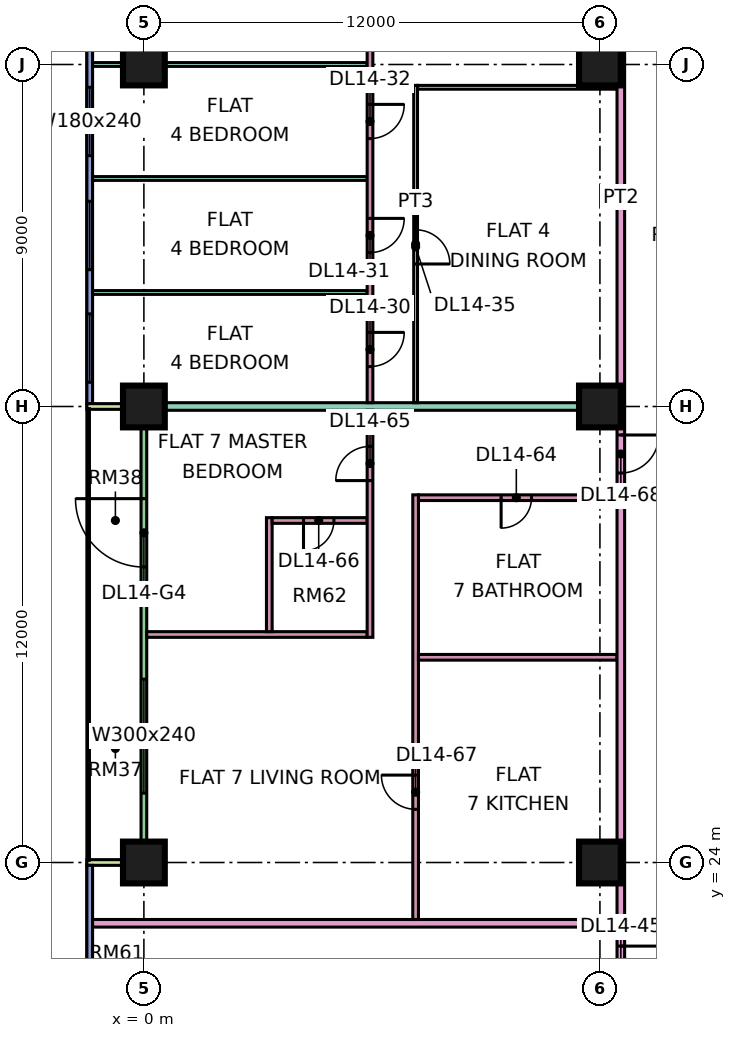
"""IFC4 building model, lengths in metres.
Left out: names, types, materials, properties, quantities, classifications, styles, units other than length and angle.
Written with IfcOpenShell. Run it as: python <this file> out.ifc"""

import sys

from ifc_helpers import new_model, si_unit, direction, frame, frame_2d, origin, origin_2d, place, context, subcontext, project, spatial, rectangle, extrude, element, fill, save


model = new_model("IFC4")
c1 = context("Model", 3, precision=1e-05, world=origin(), true_north=direction((0.0, 1.0)))
c2 = subcontext(c1, "Body", "Model", "MODEL_VIEW")
j1 = project(units=[si_unit("LENGTHUNIT", "METRE"), si_unit("PLANEANGLEUNIT", "RADIAN")], contexts=[c1])
p1 = place(None, origin())
s1 = spatial("IfcSite", under=j1, at=p1, CompositionType="ELEMENT")
p2 = place(p1, origin())
s2 = spatial("IfcBuilding", under=s1, at=p2, CompositionType="ELEMENT")
p3 = place(p2, frame((0.0, 0.0, 67.65)))
s3 = spatial("IfcBuildingStorey", under=s2, at=p3, CompositionType="ELEMENT", Elevation=67.65)
p4 = place(p3, frame((0.0, 24.0, 0.0), z_axis=(0.0, 0.0, 1.0), x_axis=(1.0, 0.0, 0.0)))
e1 = element("IfcColumn", 1, at=p4, inside=s3, PredefinedType="COLUMN", context=c2, shape_type="SweptSolid", body=[
    extrude(rectangle(XDim=1.1, YDim=1.1, at=origin_2d()), origin(), (0.0, 0.0, 1.0), 3.75),
])
p5 = place(p3, frame((0.0, 36.0, 0.0), z_axis=(0.0, 0.0, 1.0), x_axis=(1.0, 0.0, 0.0)))
e2 = element("IfcColumn", 2, at=p5, inside=s3, PredefinedType="COLUMN", context=c2, shape_type="SweptSolid", body=[
    extrude(rectangle(XDim=1.1, YDim=1.1, at=origin_2d()), origin(), (0.0, 0.0, 1.0), 3.75),
])
for number, where, z_axis, x_axis in (
    (3, (0.0, 45.0, 0.0), (0.0, 0.0, 1.0), (1.0, 0.0, 0.0)),
    (4, (12.0, 24.0, 0.0), (0.0, 0.0, 1.0), (1.0, 0.0, 0.0)),
    (5, (12.0, 36.0, 0.0), (0.0, 0.0, 1.0), (1.0, 0.0, 0.0)),
    (6, (12.0, 45.0, 0.0), (0.0, 0.0, 1.0), (1.0, 0.0, 0.0)),
):
    element("IfcColumn", number, at=place(p3, frame(where, z_axis=z_axis, x_axis=x_axis)), inside=s3, PredefinedType="COLUMN", context=c2, shape_type="SweptSolid", body=[
        extrude(rectangle(XDim=1.1, YDim=1.1, at=origin_2d()), origin(), (0.0, 0.0, 1.0), 3.75),
    ])
p6 = place(p3, frame((-1.425, 47.925, 0.0), z_axis=(0.0, 0.0, 1.0), x_axis=(0.0, -1.0, 0.0)))
e7 = element("IfcWall", 7, at=p6, inside=s3, PredefinedType="SOLIDWALL", context=c2, shape_type="SweptSolid", body=[
    extrude(rectangle(XDim=11.85, YDim=0.15, at=frame_2d((5.925, 0.0))), origin(), (0.0, 0.0, 1.0), 3.35),
])
p7 = place(p6, frame((0.562, 0.0, 0.45)))
e8 = element("IfcOpeningElement", 8, at=p7, cuts=e7, PredefinedType="OPENING", context=c2, shape_type="SweptSolid", body=[
    extrude(rectangle(XDim=1.8, YDim=2.4, at=frame_2d((0.9, 1.2))), frame((0.0, 0.085, 0.0), z_axis=(0.0, -1.0, 0.0), x_axis=(1.0, 0.0, 0.0)), (0.0, 0.0, 1.0), 0.17),
])
p8 = place(p6, frame((3.525, 0.0, 0.45)))
e9 = element("IfcOpeningElement", 9, at=p8, cuts=e7, PredefinedType="OPENING", context=c2, shape_type="SweptSolid", body=[
    extrude(rectangle(XDim=1.8, YDim=2.4, at=frame_2d((0.9, 1.2))), frame((0.0, 0.085, 0.0), z_axis=(0.0, -1.0, 0.0), x_axis=(1.0, 0.0, 0.0)), (0.0, 0.0, 1.0), 0.17),
])
p9 = place(p6, frame((6.525, 0.0, 0.45)))
e10 = element("IfcOpeningElement", 10, at=p9, cuts=e7, PredefinedType="OPENING", context=c2, shape_type="SweptSolid", body=[
    extrude(rectangle(XDim=1.8, YDim=2.4, at=frame_2d((0.9, 1.2))), frame((0.0, 0.085, 0.0), z_axis=(0.0, -1.0, 0.0), x_axis=(1.0, 0.0, 0.0)), (0.0, 0.0, 1.0), 0.17),
])
p10 = place(p6, frame((9.488, 0.0, 0.45)))
e11 = element("IfcOpeningElement", 11, at=p10, cuts=e7, PredefinedType="OPENING", context=c2, shape_type="SweptSolid", body=[
    extrude(rectangle(XDim=1.8, YDim=2.4, at=frame_2d((0.9, 1.2))), frame((0.0, 0.085, 0.0), z_axis=(0.0, -1.0, 0.0), x_axis=(1.0, 0.0, 0.0)), (0.0, 0.0, 1.0), 0.17),
])
p11 = place(p3, frame((0.0, 35.925, 0.0), z_axis=(0.0, 0.0, 1.0), x_axis=(0.0, -1.0, 0.0)))
e12 = element("IfcWall", 12, at=p11, inside=s3, PredefinedType="SOLIDWALL", context=c2, shape_type="SweptSolid", body=[
    extrude(rectangle(XDim=11.85, YDim=0.15, at=frame_2d((5.925, 0.0))), origin(), (0.0, 0.0, 1.0), 3.35),
])
p12 = place(p11, frame((2.35, 0.0, 0.0)))
e13 = element("IfcOpeningElement", 13, at=p12, cuts=e12, PredefinedType="OPENING", context=c2, shape_type="SweptSolid", body=[
    extrude(rectangle(XDim=1.8, YDim=2.4, at=frame_2d((0.9, 1.2))), frame((0.0, 0.085, 0.0), z_axis=(0.0, -1.0, 0.0), x_axis=(1.0, 0.0, 0.0)), (0.0, 0.0, 1.0), 0.17),
])
p13 = place(p11, frame((7.1, 0.0, 0.45)))
e14 = element("IfcOpeningElement", 14, at=p13, cuts=e12, PredefinedType="OPENING", context=c2, shape_type="SweptSolid", body=[
    extrude(rectangle(XDim=3.0, YDim=2.4, at=frame_2d((1.5, 1.2))), frame((0.0, 0.085, 0.0), z_axis=(0.0, -1.0, 0.0), x_axis=(1.0, 0.0, 0.0)), (0.0, 0.0, 1.0), 0.17),
])
for number, where, z_axis, x_axis in (
    (15, (-1.5, 36.0, 0.0), (0.0, 0.0, 1.0), (1.0, 0.0, 0.0)),
    (16, (-1.5, 24.0, 0.0), (0.0, 0.0, 1.0), (1.0, 0.0, 0.0)),
):
    element("IfcWall", number, at=place(p3, frame(where, z_axis=z_axis, x_axis=x_axis)), inside=s3, PredefinedType="SOLIDWALL", context=c2, shape_type="SweptSolid", body=[
        extrude(rectangle(XDim=1.5, YDim=0.15, at=frame_2d((0.75, 0.0))), origin(), (0.0, 0.0, 1.0), 3.35),
    ])
p14 = place(p3, frame((-1.425, 23.925, 0.0), z_axis=(0.0, 0.0, 1.0), x_axis=(0.0, -1.0, 0.0)))
e17 = element("IfcWall", 17, at=p14, inside=s3, PredefinedType="SOLIDWALL", context=c2, shape_type="SweptSolid", body=[
    extrude(rectangle(XDim=11.425, YDim=0.15, at=frame_2d((5.712, 0.0))), origin(), (0.0, 0.0, 1.0), 3.35),
])
p15 = place(p14, frame((6.175, 0.0, 0.45)))
e18 = element("IfcOpeningElement", 18, at=p15, cuts=e17, PredefinedType="OPENING", context=c2, shape_type="SweptSolid", body=[
    extrude(rectangle(XDim=3.0, YDim=2.4, at=frame_2d((1.5, 1.2))), frame((0.0, 0.085, 0.0), z_axis=(0.0, -1.0, 0.0), x_axis=(1.0, 0.0, 0.0)), (0.0, 0.0, 1.0), 0.17),
])
for number, where, z_axis, x_axis in (
    (19, (-1.351, 39.0, 0.0), (0.0, 0.0, 1.0), (1.0, 0.0, 0.0)),
    (20, (-1.351, 42.0, 0.0), (0.0, 0.0, 1.0), (1.0, 0.0, 0.0)),
    (21, (-1.351, 45.0, 0.0), (0.0, 0.0, 1.0), (1.0, 0.0, 0.0)),
):
    element("IfcWall", number, at=place(p3, frame(where, z_axis=z_axis, x_axis=x_axis)), inside=s3, PredefinedType="PARTITIONING", context=c2, shape_type="SweptSolid", body=[
        extrude(rectangle(XDim=7.226, YDim=0.1, at=frame_2d((3.613, 0.0))), origin(), (0.0, 0.0, 1.0), 3.35),
    ])
p16 = place(p3, frame((-1.35, 22.4, 0.0), z_axis=(0.0, 0.0, 1.0), x_axis=(1.0, 0.0, 0.0)))
e22 = element("IfcWall", 22, at=p16, inside=s3, PredefinedType="PARTITIONING", context=c2, shape_type="SweptSolid", body=[
    extrude(rectangle(XDim=13.8, YDim=0.2, at=frame_2d((6.9, 0.0))), origin(), (0.0, 0.0, 1.0), 3.35),
])
e23 = element("IfcWall", 23, at=p5, inside=s3, PredefinedType="PARTITIONING", context=c2, shape_type="SweptSolid", body=[
    extrude(rectangle(XDim=12.45, YDim=0.2, at=frame_2d((6.225, 0.0))), origin(), (0.0, 0.0, 1.0), 3.35),
])
p17 = place(p3, frame((0.074, 30.0, 0.0), z_axis=(0.0, 0.0, 1.0), x_axis=(1.0, 0.0, 0.0)))
e24 = element("IfcWall", 24, at=p17, inside=s3, PredefinedType="PARTITIONING", context=c2, shape_type="SweptSolid", body=[
    extrude(rectangle(XDim=5.801, YDim=0.15, at=frame_2d((2.9, 0.0))), origin(), (0.0, 0.0, 1.0), 3.35),
])
p18 = place(p3, frame((3.3, 30.075, 0.0), z_axis=(0.0, 0.0, 1.0), x_axis=(0.0, 1.0, 0.0)))
e25 = element("IfcWall", 25, at=p18, inside=s3, PredefinedType="PARTITIONING", context=c2, shape_type="SweptSolid", body=[
    extrude(rectangle(XDim=3.0, YDim=0.15, at=frame_2d((1.5, 0.0))), origin(), (0.0, 0.0, 1.0), 3.35),
])
p19 = place(p3, frame((3.375, 33.0, 0.0), z_axis=(0.0, 0.0, 1.0), x_axis=(1.0, 0.0, 0.0)))
e26 = element("IfcWall", 26, at=p19, inside=s3, PredefinedType="PARTITIONING", context=c2, shape_type="SweptSolid", body=[
    extrude(rectangle(XDim=2.5, YDim=0.15, at=frame_2d((1.25, 0.0))), origin(), (0.0, 0.0, 1.0), 3.35),
])
p20 = place(p19, frame((0.825, 0.0, 0.0)))
e27 = element("IfcOpeningElement", 27, at=p20, cuts=e26, PredefinedType="OPENING", context=c2, shape_type="SweptSolid", body=[
    extrude(rectangle(XDim=0.8, YDim=2.1, at=frame_2d((0.4, 1.05))), frame((0.0, 0.085, 0.0), z_axis=(0.0, -1.0, 0.0), x_axis=(1.0, 0.0, 0.0)), (0.0, 0.0, 1.0), 0.17),
])
p21 = place(p3, frame((5.95, 29.925, 0.0), z_axis=(0.0, 0.0, 1.0), x_axis=(0.0, 1.0, 0.0)))
e28 = element("IfcWall", 28, at=p21, inside=s3, PredefinedType="PARTITIONING", context=c2, shape_type="SweptSolid", body=[
    extrude(rectangle(XDim=5.975, YDim=0.15, at=frame_2d((2.987, 0.0))), origin(), (0.0, 0.0, 1.0), 3.35),
])
p22 = place(p21, frame((4.125, 0.0, 0.0)))
e29 = element("IfcOpeningElement", 29, at=p22, cuts=e28, PredefinedType="OPENING", context=c2, shape_type="SweptSolid", body=[
    extrude(rectangle(XDim=0.9, YDim=2.1, at=frame_2d((0.45, 1.05))), frame((0.0, 0.085, 0.0), z_axis=(0.0, -1.0, 0.0), x_axis=(1.0, 0.0, 0.0)), (0.0, 0.0, 1.0), 0.17),
])
p23 = place(p3, frame((5.95, 36.1, 0.0), z_axis=(0.0, 0.0, 1.0), x_axis=(0.0, 1.0, 0.0)))
e30 = element("IfcWall", 30, at=p23, inside=s3, PredefinedType="PARTITIONING", context=c2, shape_type="SweptSolid", body=[
    extrude(rectangle(XDim=26.826, YDim=0.15, at=frame_2d((13.413, 0.0))), origin(), (0.0, 0.0, 1.0), 3.35),
])
p24 = place(p23, frame((0.95, 0.0, 0.0)))
e31 = element("IfcOpeningElement", 31, at=p24, cuts=e30, PredefinedType="OPENING", context=c2, shape_type="SweptSolid", body=[
    extrude(rectangle(XDim=0.9, YDim=2.1, at=frame_2d((0.45, 1.05))), frame((0.0, 0.085, 0.0), z_axis=(0.0, -1.0, 0.0), x_axis=(1.0, 0.0, 0.0)), (0.0, 0.0, 1.0), 0.17),
])
p25 = place(p23, frame((3.95, 0.0, 0.0)))
e32 = element("IfcOpeningElement", 32, at=p25, cuts=e30, PredefinedType="OPENING", context=c2, shape_type="SweptSolid", body=[
    extrude(rectangle(XDim=0.9, YDim=2.1, at=frame_2d((0.45, 1.05))), frame((0.0, 0.085, 0.0), z_axis=(0.0, -1.0, 0.0), x_axis=(1.0, 0.0, 0.0)), (0.0, 0.0, 1.0), 0.17),
])
p26 = place(p23, frame((6.95, 0.0, 0.0)))
e33 = element("IfcOpeningElement", 33, at=p26, cuts=e30, PredefinedType="OPENING", context=c2, shape_type="SweptSolid", body=[
    extrude(rectangle(XDim=0.9, YDim=2.1, at=frame_2d((0.45, 1.05))), frame((0.0, 0.085, 0.0), z_axis=(0.0, -1.0, 0.0), x_axis=(1.0, 0.0, 0.0)), (0.0, 0.0, 1.0), 0.17),
])
p27 = place(p23, frame((9.95, 0.0, 0.0)))
e34 = element("IfcOpeningElement", 34, at=p27, cuts=e30, PredefinedType="OPENING", context=c2, shape_type="SweptSolid", body=[
    extrude(rectangle(XDim=0.9, YDim=2.1, at=frame_2d((0.45, 1.05))), frame((0.0, 0.085, 0.0), z_axis=(0.0, -1.0, 0.0), x_axis=(1.0, 0.0, 0.0)), (0.0, 0.0, 1.0), 0.17),
])
p28 = place(p23, frame((18.95, 0.0, 0.0)))
e35 = element("IfcOpeningElement", 35, at=p28, cuts=e30, PredefinedType="OPENING", context=c2, shape_type="SweptSolid", body=[
    extrude(rectangle(XDim=0.9, YDim=2.1, at=frame_2d((0.45, 1.05))), frame((0.0, 0.085, 0.0), z_axis=(0.0, -1.0, 0.0), x_axis=(1.0, 0.0, 0.0)), (0.0, 0.0, 1.0), 0.17),
])
p29 = place(p23, frame((23.45, 0.0, 0.0)))
e36 = element("IfcOpeningElement", 36, at=p29, cuts=e30, PredefinedType="OPENING", context=c2, shape_type="SweptSolid", body=[
    extrude(rectangle(XDim=0.9, YDim=2.1, at=frame_2d((0.45, 1.05))), frame((0.0, 0.085, 0.0), z_axis=(0.0, -1.0, 0.0), x_axis=(1.0, 0.0, 0.0)), (0.0, 0.0, 1.0), 0.17),
])
p30 = place(p23, frame((15.55, 0.0, 0.0)))
e37 = element("IfcOpeningElement", 37, at=p30, cuts=e30, PredefinedType="OPENING", context=c2, shape_type="SweptSolid", body=[
    extrude(rectangle(XDim=1.6, YDim=2.1, at=frame_2d((0.8, 1.05))), frame((0.0, 0.085, 0.0), z_axis=(0.0, -1.0, 0.0), x_axis=(1.0, 0.0, 0.0)), (0.0, 0.0, 1.0), 0.17),
])
p31 = place(p23, frame((12.95, 0.0, 0.0)))
e38 = element("IfcOpeningElement", 38, at=p31, cuts=e30, PredefinedType="OPENING", context=c2, shape_type="SweptSolid", body=[
    extrude(rectangle(XDim=0.9, YDim=2.1, at=frame_2d((0.45, 1.05))), frame((0.0, 0.085, 0.0), z_axis=(0.0, -1.0, 0.0), x_axis=(1.0, 0.0, 0.0)), (0.0, 0.0, 1.0), 0.17),
])
p32 = place(p3, frame((7.15, 22.5, 0.0), z_axis=(0.0, 0.0, 1.0), x_axis=(0.0, 1.0, 0.0)))
e39 = element("IfcWall", 39, at=p32, inside=s3, PredefinedType="PARTITIONING", context=c2, shape_type="SweptSolid", body=[
    extrude(rectangle(XDim=11.175, YDim=0.15, at=frame_2d((5.587, 0.0))), origin(), (0.0, 0.0, 1.0), 3.35),
])
p33 = place(p32, frame((2.9, 0.0, 0.0)))
e40 = element("IfcOpeningElement", 40, at=p33, cuts=e39, PredefinedType="OPENING", context=c2, shape_type="SweptSolid", body=[
    extrude(rectangle(XDim=0.9, YDim=2.1, at=frame_2d((0.45, 1.05))), frame((0.0, 0.085, 0.0), z_axis=(0.0, -1.0, 0.0), x_axis=(1.0, 0.0, 0.0)), (0.0, 0.0, 1.0), 0.17),
])
p34 = place(p3, frame((7.15, 36.1, 0.0), z_axis=(0.0, 0.0, 1.0), x_axis=(0.0, 1.0, 0.0)))
e41 = element("IfcWall", 41, at=p34, inside=s3, PredefinedType="PARTITIONING", context=c2, shape_type="SweptSolid", body=[
    extrude(rectangle(XDim=8.35, YDim=0.1, at=frame_2d((4.175, 0.0))), origin(), (0.0, 0.0, 1.0), 3.35),
])
p35 = place(p34, frame((3.65, 0.0, 0.0)))
e42 = element("IfcOpeningElement", 42, at=p35, cuts=e41, PredefinedType="OPENING", context=c2, shape_type="SweptSolid", body=[
    extrude(rectangle(XDim=0.9, YDim=2.1, at=frame_2d((0.45, 1.05))), frame((0.0, 0.06, 0.0), z_axis=(0.0, -1.0, 0.0), x_axis=(1.0, 0.0, 0.0)), (0.0, 0.0, 1.0), 0.12),
])
p36 = place(p3, frame((7.2, 44.4, 0.0), z_axis=(0.0, 0.0, 1.0), x_axis=(1.0, 0.0, 0.0)))
e43 = element("IfcWall", 43, at=p36, inside=s3, PredefinedType="PARTITIONING", context=c2, shape_type="SweptSolid", body=[
    extrude(rectangle(XDim=5.25, YDim=0.1, at=frame_2d((2.625, 0.0))), origin(), (0.0, 0.0, 1.0), 3.35),
])
p37 = place(p3, frame((7.225, 29.4, 0.0), z_axis=(0.0, 0.0, 1.0), x_axis=(1.0, 0.0, 0.0)))
e44 = element("IfcWall", 44, at=p37, inside=s3, PredefinedType="PARTITIONING", context=c2, shape_type="SweptSolid", body=[
    extrude(rectangle(XDim=5.225, YDim=0.15, at=frame_2d((2.612, 0.0))), origin(), (0.0, 0.0, 1.0), 3.35),
])
p38 = place(p3, frame((7.225, 33.6, 0.0), z_axis=(0.0, 0.0, 1.0), x_axis=(1.0, 0.0, 0.0)))
e45 = element("IfcWall", 45, at=p38, inside=s3, PredefinedType="PARTITIONING", context=c2, shape_type="SweptSolid", body=[
    extrude(rectangle(XDim=5.225, YDim=0.15, at=frame_2d((2.612, 0.0))), origin(), (0.0, 0.0, 1.0), 3.35),
])
p39 = place(p38, frame((2.175, 0.0, 0.0)))
e46 = element("IfcOpeningElement", 46, at=p39, cuts=e45, PredefinedType="OPENING", context=c2, shape_type="SweptSolid", body=[
    extrude(rectangle(XDim=0.8, YDim=2.1, at=frame_2d((0.4, 1.05))), frame((0.0, 0.085, 0.0), z_axis=(0.0, -1.0, 0.0), x_axis=(1.0, 0.0, 0.0)), (0.0, 0.0, 1.0), 0.17),
])
p40 = place(p3, frame((12.55, 20.0, 0.0), z_axis=(0.0, 0.0, 1.0), x_axis=(0.0, 1.0, 0.0)))
e47 = element("IfcWall", 47, at=p40, inside=s3, PredefinedType="PARTITIONING", context=c2, shape_type="SweptSolid", body=[
    extrude(rectangle(XDim=43.0, YDim=0.2, at=frame_2d((21.5, 0.0))), origin(), (0.0, 0.0, 1.0), 3.35),
])
p41 = place(p40, frame((25.8, 0.0, 0.0)))
e48 = element("IfcOpeningElement", 48, at=p41, cuts=e47, PredefinedType="OPENING", context=c2, shape_type="SweptSolid", body=[
    extrude(rectangle(XDim=1.0, YDim=2.1, at=frame_2d((0.5, 1.05))), frame((0.0, 0.11, 0.0), z_axis=(0.0, -1.0, 0.0), x_axis=(1.0, 0.0, 0.0)), (0.0, 0.0, 1.0), 0.22),
])
p42 = place(p40, frame((0.6, 0.0, 0.0)))
e49 = element("IfcOpeningElement", 49, at=p42, cuts=e47, PredefinedType="OPENING", context=c2, shape_type="SweptSolid", body=[
    extrude(rectangle(XDim=1.2, YDim=2.1, at=frame_2d((0.6, 1.05))), frame((0.0, 0.11, 0.0), z_axis=(0.0, -1.0, 0.0), x_axis=(1.0, 0.0, 0.0)), (0.0, 0.0, 1.0), 0.22),
])
p43 = place(p40, frame((14.25, 0.0, 0.0)))
e50 = element("IfcOpeningElement", 50, at=p43, cuts=e47, PredefinedType="OPENING", context=c2, shape_type="SweptSolid", body=[
    extrude(rectangle(XDim=1.0, YDim=2.1, at=frame_2d((0.5, 1.05))), frame((0.0, 0.11, 0.0), z_axis=(0.0, -1.0, 0.0), x_axis=(1.0, 0.0, 0.0)), (0.0, 0.0, 1.0), 0.22),
])
p44 = place(p8, origin())
e51 = element("IfcWindow", 51, at=p44, inside=s3, PartitioningType="SINGLE_PANEL", PredefinedType="WINDOW", context=c2, shape_type="SweptSolid", body=[
    extrude(rectangle(XDim=1.8, YDim=2.4, at=frame_2d((0.9, 1.2))), frame((0.0, 0.03, 0.0), z_axis=(0.0, -1.0, 0.0), x_axis=(1.0, 0.0, 0.0)), (0.0, 0.0, 1.0), 0.06),
])
fill(e9, e51)
p45 = place(p9, origin())
e52 = element("IfcWindow", 52, at=p45, inside=s3, PartitioningType="SINGLE_PANEL", PredefinedType="WINDOW", context=c2, shape_type="SweptSolid", body=[
    extrude(rectangle(XDim=1.8, YDim=2.4, at=frame_2d((0.9, 1.2))), frame((0.0, 0.03, 0.0), z_axis=(0.0, -1.0, 0.0), x_axis=(1.0, 0.0, 0.0)), (0.0, 0.0, 1.0), 0.06),
])
fill(e10, e52)
p46 = place(p10, origin())
e53 = element("IfcWindow", 53, at=p46, inside=s3, PartitioningType="SINGLE_PANEL", PredefinedType="WINDOW", context=c2, shape_type="SweptSolid", body=[
    extrude(rectangle(XDim=1.8, YDim=2.4, at=frame_2d((0.9, 1.2))), frame((0.0, 0.03, 0.0), z_axis=(0.0, -1.0, 0.0), x_axis=(1.0, 0.0, 0.0)), (0.0, 0.0, 1.0), 0.06),
])
fill(e11, e53)
p47 = place(p12, frame((1.8, 0.0, 0.0), z_axis=(0.0, 0.0, 1.0), x_axis=(-1.0, 0.0, 0.0)))
e54 = element("IfcDoor", 54, at=p47, inside=s3, OperationType="DOUBLE_DOOR_SINGLE_SWING", PredefinedType="DOOR", context=c2, shape_type="SweptSolid", body=[
    extrude(rectangle(XDim=1.8, YDim=2.4, at=frame_2d((0.9, 1.2))), frame((0.0, 0.025, 0.0), z_axis=(0.0, -1.0, 0.0), x_axis=(1.0, 0.0, 0.0)), (0.0, 0.0, 1.0), 0.05),
])
fill(e13, e54)
p48 = place(p13, origin())
e55 = element("IfcWindow", 55, at=p48, inside=s3, PartitioningType="SINGLE_PANEL", PredefinedType="WINDOW", context=c2, shape_type="SweptSolid", body=[
    extrude(rectangle(XDim=3.0, YDim=2.4, at=frame_2d((1.5, 1.2))), frame((0.0, 0.03, 0.0), z_axis=(0.0, -1.0, 0.0), x_axis=(1.0, 0.0, 0.0)), (0.0, 0.0, 1.0), 0.06),
])
fill(e14, e55)
p49 = place(p24, origin())
e56 = element("IfcDoor", 56, at=p49, inside=s3, OperationType="SINGLE_SWING_RIGHT", PredefinedType="DOOR", context=c2, shape_type="SweptSolid", body=[
    extrude(rectangle(XDim=0.9, YDim=2.1, at=frame_2d((0.45, 1.05))), frame((0.0, 0.025, 0.0), z_axis=(0.0, -1.0, 0.0), x_axis=(1.0, 0.0, 0.0)), (0.0, 0.0, 1.0), 0.05),
])
fill(e31, e56)
p50 = place(p25, origin())
e57 = element("IfcDoor", 57, at=p50, inside=s3, OperationType="SINGLE_SWING_RIGHT", PredefinedType="DOOR", context=c2, shape_type="SweptSolid", body=[
    extrude(rectangle(XDim=0.9, YDim=2.1, at=frame_2d((0.45, 1.05))), frame((0.0, 0.025, 0.0), z_axis=(0.0, -1.0, 0.0), x_axis=(1.0, 0.0, 0.0)), (0.0, 0.0, 1.0), 0.05),
])
fill(e32, e57)
p51 = place(p26, origin())
e58 = element("IfcDoor", 58, at=p51, inside=s3, OperationType="SINGLE_SWING_RIGHT", PredefinedType="DOOR", context=c2, shape_type="SweptSolid", body=[
    extrude(rectangle(XDim=0.9, YDim=2.1, at=frame_2d((0.45, 1.05))), frame((0.0, 0.025, 0.0), z_axis=(0.0, -1.0, 0.0), x_axis=(1.0, 0.0, 0.0)), (0.0, 0.0, 1.0), 0.05),
])
fill(e33, e58)
p52 = place(p35, frame((0.9, 0.0, 0.0), z_axis=(0.0, 0.0, 1.0), x_axis=(-1.0, 0.0, 0.0)))
e59 = element("IfcDoor", 59, at=p52, inside=s3, OperationType="SINGLE_SWING_LEFT", PredefinedType="DOOR", context=c2, shape_type="SweptSolid", body=[
    extrude(rectangle(XDim=0.9, YDim=2.1, at=frame_2d((0.45, 1.05))), frame((0.0, 0.025, 0.0), z_axis=(0.0, -1.0, 0.0), x_axis=(1.0, 0.0, 0.0)), (0.0, 0.0, 1.0), 0.05),
])
fill(e42, e59)
p53 = place(p42, origin())
e60 = element("IfcDoor", 60, at=p53, inside=s3, OperationType="SINGLE_SWING_RIGHT", PredefinedType="DOOR", context=c2, shape_type="SweptSolid", body=[
    extrude(rectangle(XDim=1.2, YDim=2.1, at=frame_2d((0.6, 1.05))), frame((0.0, 0.025, 0.0), z_axis=(0.0, -1.0, 0.0), x_axis=(1.0, 0.0, 0.0)), (0.0, 0.0, 1.0), 0.05),
])
fill(e49, e60)
p54 = place(p39, frame((0.8, 0.0, 0.0), z_axis=(0.0, 0.0, 1.0), x_axis=(-1.0, 0.0, 0.0)))
e61 = element("IfcDoor", 61, at=p54, inside=s3, OperationType="SINGLE_SWING_LEFT", PredefinedType="DOOR", context=c2, shape_type="SweptSolid", body=[
    extrude(rectangle(XDim=0.8, YDim=2.1, at=frame_2d((0.4, 1.05))), frame((0.0, 0.025, 0.0), z_axis=(0.0, -1.0, 0.0), x_axis=(1.0, 0.0, 0.0)), (0.0, 0.0, 1.0), 0.05),
])
fill(e46, e61)
p55 = place(p22, origin())
e62 = element("IfcDoor", 62, at=p55, inside=s3, OperationType="SINGLE_SWING_LEFT", PredefinedType="DOOR", context=c2, shape_type="SweptSolid", body=[
    extrude(rectangle(XDim=0.9, YDim=2.1, at=frame_2d((0.45, 1.05))), frame((0.0, 0.025, 0.0), z_axis=(0.0, -1.0, 0.0), x_axis=(1.0, 0.0, 0.0)), (0.0, 0.0, 1.0), 0.05),
])
fill(e29, e62)
p56 = place(p20, frame((0.8, 0.0, 0.0), z_axis=(0.0, 0.0, 1.0), x_axis=(-1.0, 0.0, 0.0)))
e63 = element("IfcDoor", 63, at=p56, inside=s3, OperationType="SINGLE_SWING_LEFT", PredefinedType="DOOR", context=c2, shape_type="SweptSolid", body=[
    extrude(rectangle(XDim=0.8, YDim=2.1, at=frame_2d((0.4, 1.05))), frame((0.0, 0.025, 0.0), z_axis=(0.0, -1.0, 0.0), x_axis=(1.0, 0.0, 0.0)), (0.0, 0.0, 1.0), 0.05),
])
fill(e27, e63)
p57 = place(p33, frame((0.9, 0.0, 0.0), z_axis=(0.0, 0.0, 1.0), x_axis=(-1.0, 0.0, 0.0)))
e64 = element("IfcDoor", 64, at=p57, inside=s3, OperationType="SINGLE_SWING_RIGHT", PredefinedType="DOOR", context=c2, shape_type="SweptSolid", body=[
    extrude(rectangle(XDim=0.9, YDim=2.1, at=frame_2d((0.45, 1.05))), frame((0.0, 0.025, 0.0), z_axis=(0.0, -1.0, 0.0), x_axis=(1.0, 0.0, 0.0)), (0.0, 0.0, 1.0), 0.05),
])
fill(e40, e64)
p58 = place(p43, origin())
e65 = element("IfcDoor", 65, at=p58, inside=s3, OperationType="SINGLE_SWING_RIGHT", PredefinedType="DOOR", context=c2, shape_type="SweptSolid", body=[
    extrude(rectangle(XDim=1.0, YDim=2.1, at=frame_2d((0.5, 1.05))), frame((0.0, 0.025, 0.0), z_axis=(0.0, -1.0, 0.0), x_axis=(1.0, 0.0, 0.0)), (0.0, 0.0, 1.0), 0.05),
])
fill(e50, e65)
save(model, sys.argv[1])
